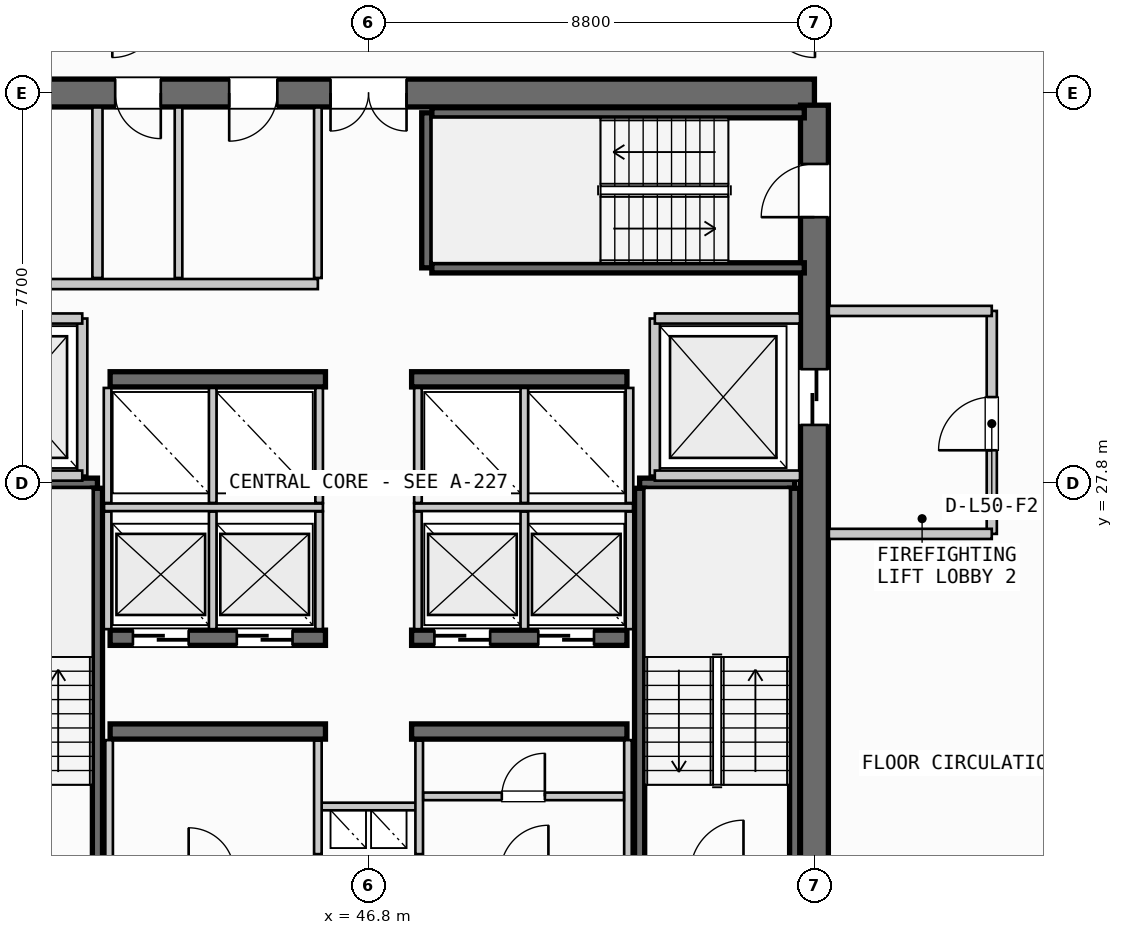
"""IFC4 building model, lengths in metres.
Left out: names, types, materials, properties, quantities, classifications, styles, units other than length and angle.
Written with IfcOpenShell. Run it as: python <this file> out.ifc"""

import sys

from ifc_helpers import new_model, si_unit, direction, frame, frame_2d, origin, place, context, subcontext, project, spatial, rectangle, extrude, source, transform, mapped, element, fill, save


model = new_model("IFC4")
c1 = context("Model", 3, precision=1e-05, world=origin(), true_north=direction((0.0, 1.0)))
c2 = subcontext(c1, "Body", "Model", "MODEL_VIEW")
j1 = project(units=[si_unit("LENGTHUNIT", "METRE"), si_unit("PLANEANGLEUNIT", "RADIAN")], contexts=[c1])
p1 = place(None, origin())
s1 = spatial("IfcSite", under=j1, at=p1, CompositionType="ELEMENT")
p2 = place(p1, origin())
s2 = spatial("IfcBuilding", under=s1, at=p2, CompositionType="ELEMENT")
p3 = place(p2, frame((0.0, 0.0, 193.9)))
s3 = spatial("IfcBuildingStorey", under=s2, at=p3, CompositionType="ELEMENT", Elevation=193.9)
p4 = place(p3, frame((55.6, 35.5, 0.0), z_axis=(0.0, 0.0, 1.0), x_axis=(-1.0, 0.0, 0.0)))
e1 = element("IfcWall", 1, at=p4, inside=s3, PredefinedType="SHEAR", context=c2, shape_type="SweptSolid", body=[
    extrude(rectangle(XDim=17.6, YDim=0.55, at=frame_2d((8.8, 0.0))), origin(), (0.0, 0.0, 1.0), 3.26),
])
p5 = place(p4, frame((8.05, 0.0, 0.0)))
e2 = element("IfcOpeningElement", 2, at=p5, cuts=e1, PredefinedType="OPENING", context=c2, shape_type="SweptSolid", body=[
    extrude(rectangle(XDim=1.5, YDim=2.2, at=frame_2d((0.75, 1.1))), frame((0.0, 0.285, 0.0), z_axis=(0.0, -1.0, 0.0), x_axis=(1.0, 0.0, 0.0)), (0.0, 0.0, 1.0), 0.57),
])
p6 = place(p4, frame((15.1, 0.0, 0.0)))
e3 = element("IfcOpeningElement", 3, at=p6, cuts=e1, PredefinedType="OPENING", context=c2, shape_type="SweptSolid", body=[
    extrude(rectangle(XDim=0.95, YDim=2.15, at=frame_2d((0.475, 1.075))), frame((0.0, 0.285, 0.0), z_axis=(0.0, -1.0, 0.0), x_axis=(1.0, 0.0, 0.0)), (0.0, 0.0, 1.0), 0.57),
])
p7 = place(p4, frame((12.9, 0.0, 0.0)))
e4 = element("IfcOpeningElement", 4, at=p7, cuts=e1, PredefinedType="OPENING", context=c2, shape_type="SweptSolid", body=[
    extrude(rectangle(XDim=0.9, YDim=2.15, at=frame_2d((0.45, 1.075))), frame((0.0, 0.285, 0.0), z_axis=(0.0, -1.0, 0.0), x_axis=(1.0, 0.0, 0.0)), (0.0, 0.0, 1.0), 0.57),
])
p8 = place(p4, frame((10.6, 0.0, 0.0)))
e5 = element("IfcOpeningElement", 5, at=p8, cuts=e1, PredefinedType="OPENING", context=c2, shape_type="SweptSolid", body=[
    extrude(rectangle(XDim=0.95, YDim=2.15, at=frame_2d((0.475, 1.075))), frame((0.0, 0.285, 0.0), z_axis=(0.0, -1.0, 0.0), x_axis=(1.0, 0.0, 0.0)), (0.0, 0.0, 1.0), 0.57),
])
p9 = place(p3, frame((55.6, 20.34, 0.0), z_axis=(0.0, 0.0, 1.0), x_axis=(0.0, 1.0, 0.0)))
e6 = element("IfcWall", 6, at=p9, inside=s3, PredefinedType="SHEAR", context=c2, shape_type="SweptSolid", body=[
    extrude(rectangle(XDim=14.92, YDim=0.55, at=frame_2d((7.46, 0.0))), origin(), (0.0, 0.0, 1.0), 3.26),
])
p10 = place(p9, frame((12.71, 0.0, 0.0)))
e7 = element("IfcOpeningElement", 7, at=p10, cuts=e6, PredefinedType="OPENING", context=c2, shape_type="SweptSolid", body=[
    extrude(rectangle(XDim=1.05, YDim=2.15, at=frame_2d((0.525, 1.075))), frame((0.0, 0.285, 0.0), z_axis=(0.0, -1.0, 0.0), x_axis=(1.0, 0.0, 0.0)), (0.0, 0.0, 1.0), 0.57),
])
p11 = place(p9, frame((8.61, 0.0, 0.0)))
e8 = element("IfcOpeningElement", 8, at=p11, cuts=e6, PredefinedType="OPENING", context=c2, shape_type="SweptSolid", body=[
    extrude(rectangle(XDim=1.1, YDim=2.2, at=frame_2d((0.55, 1.1))), frame((0.0, 0.285, 0.0), z_axis=(0.0, -1.0, 0.0), x_axis=(1.0, 0.0, 0.0)), (0.0, 0.0, 1.0), 0.57),
])
for number, where, z_axis, x_axis in (
    (9, (41.7, 22.9, 0.0), (0.0, 0.0, 1.0), (1.0, 0.0, 0.0)),
    (10, (47.65, 22.9, 0.0), (0.0, 0.0, 1.0), (1.0, 0.0, 0.0)),
):
    element("IfcWall", number, at=place(p3, frame(where, z_axis=z_axis, x_axis=x_axis)), inside=s3, PredefinedType="SHEAR", context=c2, shape_type="SweptSolid", body=[
        extrude(rectangle(XDim=4.25, YDim=0.3, at=frame_2d((2.125, 0.0))), origin(), (0.0, 0.0, 1.0), 3.26),
    ])
p12 = place(p3, frame((41.7, 24.75, 0.0), z_axis=(0.0, 0.0, 1.0), x_axis=(1.0, 0.0, 0.0)))
e11 = element("IfcWall", 11, at=p12, inside=s3, PredefinedType="SHEAR", context=c2, shape_type="SweptSolid", body=[
    extrude(rectangle(XDim=4.25, YDim=0.3, at=frame_2d((2.125, 0.0))), origin(), (0.0, 0.0, 1.0), 3.26),
])
p13 = place(p12, frame((0.45, 0.0, 0.0)))
e12 = element("IfcOpeningElement", 12, at=p13, cuts=e11, PredefinedType="OPENING", context=c2, shape_type="SweptSolid", body=[
    extrude(rectangle(XDim=1.1, YDim=2.2, at=frame_2d((0.55, 1.1))), frame((0.0, 0.16, 0.0), z_axis=(0.0, -1.0, 0.0), x_axis=(1.0, 0.0, 0.0)), (0.0, 0.0, 1.0), 0.32),
])
p14 = place(p12, frame((2.5, 0.0, 0.0)))
e13 = element("IfcOpeningElement", 13, at=p14, cuts=e11, PredefinedType="OPENING", context=c2, shape_type="SweptSolid", body=[
    extrude(rectangle(XDim=1.1, YDim=2.2, at=frame_2d((0.55, 1.1))), frame((0.0, 0.16, 0.0), z_axis=(0.0, -1.0, 0.0), x_axis=(1.0, 0.0, 0.0)), (0.0, 0.0, 1.0), 0.32),
])
p15 = place(p3, frame((47.65, 24.75, 0.0), z_axis=(0.0, 0.0, 1.0), x_axis=(1.0, 0.0, 0.0)))
e14 = element("IfcWall", 14, at=p15, inside=s3, PredefinedType="SHEAR", context=c2, shape_type="SweptSolid", body=[
    extrude(rectangle(XDim=4.25, YDim=0.3, at=frame_2d((2.125, 0.0))), origin(), (0.0, 0.0, 1.0), 3.26),
])
p16 = place(p15, frame((0.45, 0.0, 0.0)))
e15 = element("IfcOpeningElement", 15, at=p16, cuts=e14, PredefinedType="OPENING", context=c2, shape_type="SweptSolid", body=[
    extrude(rectangle(XDim=1.1, YDim=2.2, at=frame_2d((0.55, 1.1))), frame((0.0, 0.16, 0.0), z_axis=(0.0, -1.0, 0.0), x_axis=(1.0, 0.0, 0.0)), (0.0, 0.0, 1.0), 0.32),
])
p17 = place(p15, frame((2.5, 0.0, 0.0)))
e16 = element("IfcOpeningElement", 16, at=p17, cuts=e14, PredefinedType="OPENING", context=c2, shape_type="SweptSolid", body=[
    extrude(rectangle(XDim=1.1, YDim=2.2, at=frame_2d((0.55, 1.1))), frame((0.0, 0.16, 0.0), z_axis=(0.0, -1.0, 0.0), x_axis=(1.0, 0.0, 0.0)), (0.0, 0.0, 1.0), 0.32),
])
for number, where, z_axis, x_axis in (
    (17, (41.7, 29.85, 0.0), (0.0, 0.0, 1.0), (1.0, 0.0, 0.0)),
    (18, (47.65, 29.85, 0.0), (0.0, 0.0, 1.0), (1.0, 0.0, 0.0)),
):
    element("IfcWall", number, at=place(p3, frame(where, z_axis=z_axis, x_axis=x_axis)), inside=s3, PredefinedType="SHEAR", context=c2, shape_type="SweptSolid", body=[
        extrude(rectangle(XDim=4.25, YDim=0.3, at=frame_2d((2.125, 0.0))), origin(), (0.0, 0.0, 1.0), 3.26),
    ])
p18 = place(p3, frame((38.39, 27.8, 0.0), z_axis=(0.0, 0.0, 1.0), x_axis=(1.0, 0.0, 0.0)))
e19 = element("IfcWall", 19, at=p18, inside=s3, PredefinedType="SHEAR", context=c2, shape_type="SweptSolid", body=[
    extrude(rectangle(XDim=3.06, YDim=0.2, at=frame_2d((1.53, 0.0))), origin(), (0.0, 0.0, 1.0), 3.26),
])
p19 = place(p3, frame((41.45, 27.7, 0.0), z_axis=(0.0, 0.0, 1.0), x_axis=(0.0, -1.0, 0.0)))
e20 = element("IfcWall", 20, at=p19, inside=s3, PredefinedType="SHEAR", context=c2, shape_type="SweptSolid", body=[
    extrude(rectangle(XDim=7.35, YDim=0.2, at=frame_2d((3.675, 0.0))), origin(), (0.0, 0.0, 1.0), 3.26),
])
p20 = place(p3, frame((52.15, 27.8, 0.0), z_axis=(0.0, 0.0, 1.0), x_axis=(1.0, 0.0, 0.0)))
e21 = element("IfcWall", 21, at=p20, inside=s3, PredefinedType="SHEAR", context=c2, shape_type="SweptSolid", body=[
    extrude(rectangle(XDim=3.06, YDim=0.2, at=frame_2d((1.53, 0.0))), origin(), (0.0, 0.0, 1.0), 3.26),
])
for number, where, z_axis, x_axis in (
    (22, (55.21, 27.7, 0.0), (0.0, 0.0, 1.0), (0.0, -1.0, 0.0)),
    (23, (52.15, 20.35, 0.0), (0.0, 0.0, 1.0), (0.0, 1.0, 0.0)),
):
    element("IfcWall", number, at=place(p3, frame(where, z_axis=z_axis, x_axis=x_axis)), inside=s3, PredefinedType="SHEAR", context=c2, shape_type="SweptSolid", body=[
        extrude(rectangle(XDim=7.35, YDim=0.2, at=frame_2d((3.675, 0.0))), origin(), (0.0, 0.0, 1.0), 3.26),
    ])
p21 = place(p3, frame((47.95, 32.05, 0.0), z_axis=(0.0, 0.0, 1.0), x_axis=(0.0, 1.0, 0.0)))
e24 = element("IfcWall", 24, at=p21, inside=s3, PredefinedType="SHEAR", context=c2, shape_type="SweptSolid", body=[
    extrude(rectangle(XDim=3.06, YDim=0.2, at=frame_2d((1.53, 0.0))), origin(), (0.0, 0.0, 1.0), 3.26),
])
for number, where, z_axis, x_axis in (
    (25, (48.05, 35.11, 0.0), (0.0, 0.0, 1.0), (1.0, 0.0, 0.0)),
    (26, (55.4, 32.05, 0.0), (0.0, 0.0, 1.0), (-1.0, 0.0, 0.0)),
):
    element("IfcWall", number, at=place(p3, frame(where, z_axis=z_axis, x_axis=x_axis)), inside=s3, PredefinedType="SHEAR", context=c2, shape_type="SweptSolid", body=[
        extrude(rectangle(XDim=7.35, YDim=0.2, at=frame_2d((3.675, 0.0))), origin(), (0.0, 0.0, 1.0), 3.26),
    ])
p22 = place(p3, frame((45.8, 21.42, 0.0), z_axis=(0.0, 0.0, 1.0), x_axis=(1.0, 0.0, 0.0)))
e27 = element("IfcWall", 27, at=p22, inside=s3, PredefinedType="PARTITIONING", context=c2, shape_type="SweptSolid", body=[
    extrude(rectangle(XDim=2.0, YDim=0.15, at=frame_2d((1.0, 0.0))), origin(), (0.0, 0.0, 1.0), 2.735),
])
for number, where, z_axis, x_axis in (
    (28, (45.8, 20.48, 0.0), (0.0, 0.0, 1.0), (0.0, 1.0, 0.0)),
    (29, (47.8, 20.48, 0.0), (0.0, 0.0, 1.0), (0.0, 1.0, 0.0)),
):
    element("IfcWall", number, at=place(p3, frame(where, z_axis=z_axis, x_axis=x_axis)), inside=s3, PredefinedType="PARTITIONING", context=c2, shape_type="SweptSolid", body=[
        extrude(rectangle(XDim=2.24, YDim=0.15, at=frame_2d((1.12, 0.0))), origin(), (0.0, 0.0, 1.0), 2.735),
    ])
p23 = place(p3, frame((41.15, 27.95, 0.0), z_axis=(0.0, 0.0, 1.0), x_axis=(0.0, 1.0, 0.0)))
e30 = element("IfcWall", 30, at=p23, inside=s3, PredefinedType="PARTITIONING", context=c2, shape_type="SweptSolid", body=[
    extrude(rectangle(XDim=3.1, YDim=0.2, at=frame_2d((1.55, 0.0))), origin(), (0.0, 0.0, 1.0), 2.735),
])
for number, where, z_axis, x_axis in (
    (31, (38.285, 27.95, 0.0), (0.0, 0.0, 1.0), (1.0, 0.0, 0.0)),
    (32, (38.285, 31.05, 0.0), (0.0, 0.0, 1.0), (1.0, 0.0, 0.0)),
):
    element("IfcWall", number, at=place(p3, frame(where, z_axis=z_axis, x_axis=x_axis)), inside=s3, PredefinedType="PARTITIONING", context=c2, shape_type="SweptSolid", body=[
        extrude(rectangle(XDim=2.865, YDim=0.2, at=frame_2d((1.433, 0.0))), origin(), (0.0, 0.0, 1.0), 2.735),
    ])
p24 = place(p3, frame((52.45, 27.95, 0.0), z_axis=(0.0, 0.0, 1.0), x_axis=(0.0, 1.0, 0.0)))
e33 = element("IfcWall", 33, at=p24, inside=s3, PredefinedType="PARTITIONING", context=c2, shape_type="SweptSolid", body=[
    extrude(rectangle(XDim=3.1, YDim=0.2, at=frame_2d((1.55, 0.0))), origin(), (0.0, 0.0, 1.0), 2.735),
])
for number, where, z_axis, x_axis in (
    (34, (52.45, 27.95, 0.0), (0.0, 0.0, 1.0), (1.0, 0.0, 0.0)),
    (35, (52.45, 31.05, 0.0), (0.0, 0.0, 1.0), (1.0, 0.0, 0.0)),
):
    element("IfcWall", number, at=place(p3, frame(where, z_axis=z_axis, x_axis=x_axis)), inside=s3, PredefinedType="PARTITIONING", context=c2, shape_type="SweptSolid", body=[
        extrude(rectangle(XDim=2.865, YDim=0.2, at=frame_2d((1.433, 0.0))), origin(), (0.0, 0.0, 1.0), 2.735),
    ])
p25 = place(p3, frame((59.1, 26.8, 0.0), z_axis=(0.0, 0.0, 1.0), x_axis=(0.0, 1.0, 0.0)))
e36 = element("IfcWall", 36, at=p25, inside=s3, PredefinedType="PARTITIONING", context=c2, shape_type="SweptSolid", body=[
    extrude(rectangle(XDim=4.4, YDim=0.2, at=frame_2d((2.2, 0.0))), origin(), (0.0, 0.0, 1.0), 2.735),
])
p26 = place(p25, frame((1.65, 0.0, 0.0)))
e37 = element("IfcOpeningElement", 37, at=p26, cuts=e36, PredefinedType="OPENING", context=c2, shape_type="SweptSolid", body=[
    extrude(rectangle(XDim=1.05, YDim=2.15, at=frame_2d((0.525, 1.075))), frame((0.0, 0.11, 0.0), z_axis=(0.0, -1.0, 0.0), x_axis=(1.0, 0.0, 0.0)), (0.0, 0.0, 1.0), 0.22),
])
for number, where, z_axis, x_axis in (
    (38, (55.885, 26.8, 0.0), (0.0, 0.0, 1.0), (1.0, 0.0, 0.0)),
    (39, (55.885, 31.2, 0.0), (0.0, 0.0, 1.0), (1.0, 0.0, 0.0)),
):
    element("IfcWall", number, at=place(p3, frame(where, z_axis=z_axis, x_axis=x_axis)), inside=s3, PredefinedType="PARTITIONING", context=c2, shape_type="SweptSolid", body=[
        extrude(rectangle(XDim=3.215, YDim=0.2, at=frame_2d((1.607, 0.0))), origin(), (0.0, 0.0, 1.0), 2.735),
    ])
for number, where, z_axis, x_axis in (
    (40, (41.68, 20.385, 0.0), (0.0, 0.0, 1.0), (0.0, 1.0, 0.0)),
    (41, (51.92, 20.385, 0.0), (0.0, 0.0, 1.0), (0.0, 1.0, 0.0)),
):
    element("IfcWall", number, at=place(p3, frame(where, z_axis=z_axis, x_axis=x_axis)), inside=s3, PredefinedType="PARTITIONING", context=c2, shape_type="SweptSolid", body=[
        extrude(rectangle(XDim=2.345, YDim=0.15, at=frame_2d((1.172, 0.0))), origin(), (0.0, 0.0, 1.0), 2.735),
    ])
p27 = place(p3, frame((47.88, 21.62, 0.0), z_axis=(0.0, 0.0, 1.0), x_axis=(1.0, 0.0, 0.0)))
e42 = element("IfcWall", 42, at=p27, inside=s3, PredefinedType="PARTITIONING", context=c2, shape_type="SweptSolid", body=[
    extrude(rectangle(XDim=3.96, YDim=0.15, at=frame_2d((1.98, 0.0))), origin(), (0.0, 0.0, 1.0), 2.735),
])
p28 = place(p27, frame((1.55, 0.0, 0.0)))
e43 = element("IfcOpeningElement", 43, at=p28, cuts=e42, PredefinedType="OPENING", context=c2, shape_type="SweptSolid", body=[
    extrude(rectangle(XDim=0.85, YDim=2.15, at=frame_2d((0.425, 1.075))), frame((0.0, 0.085, 0.0), z_axis=(0.0, -1.0, 0.0), x_axis=(1.0, 0.0, 0.0)), (0.0, 0.0, 1.0), 0.17),
])
p29 = place(p3, frame((41.58, 27.325, 0.0), z_axis=(0.0, 0.0, 1.0), x_axis=(1.0, 0.0, 0.0)))
e44 = element("IfcWall", 44, at=p29, inside=s3, PredefinedType="PARTITIONING", context=c2, shape_type="SweptSolid", body=[
    extrude(rectangle(XDim=4.32, YDim=0.15, at=frame_2d((2.16, 0.0))), origin(), (0.0, 0.0, 1.0), 2.735),
])
p30 = place(p3, frame((47.7, 27.325, 0.0), z_axis=(0.0, 0.0, 1.0), x_axis=(1.0, 0.0, 0.0)))
e45 = element("IfcWall", 45, at=p30, inside=s3, PredefinedType="PARTITIONING", context=c2, shape_type="SweptSolid", body=[
    extrude(rectangle(XDim=4.32, YDim=0.15, at=frame_2d((2.16, 0.0))), origin(), (0.0, 0.0, 1.0), 2.735),
])
for number, where, z_axis, x_axis in (
    (46, (41.65, 24.92, 0.0), (0.0, 0.0, 1.0), (0.0, 1.0, 0.0)),
    (47, (43.725, 24.92, 0.0), (0.0, 0.0, 1.0), (0.0, 1.0, 0.0)),
    (48, (45.825, 24.92, 0.0), (0.0, 0.0, 1.0), (0.0, 1.0, 0.0)),
    (49, (47.775, 24.92, 0.0), (0.0, 0.0, 1.0), (0.0, 1.0, 0.0)),
    (50, (49.875, 24.92, 0.0), (0.0, 0.0, 1.0), (0.0, 1.0, 0.0)),
    (51, (51.95, 24.92, 0.0), (0.0, 0.0, 1.0), (0.0, 1.0, 0.0)),
):
    element("IfcWall", number, at=place(p3, frame(where, z_axis=z_axis, x_axis=x_axis)), inside=s3, PredefinedType="PARTITIONING", context=c2, shape_type="SweptSolid", body=[
        extrude(rectangle(XDim=2.32, YDim=0.15, at=frame_2d((1.16, 0.0))), origin(), (0.0, 0.0, 1.0), 2.735),
    ])
for number, where, z_axis, x_axis in (
    (52, (41.65, 27.41, 0.0), (0.0, 0.0, 1.0), (0.0, 1.0, 0.0)),
    (53, (43.725, 27.41, 0.0), (0.0, 0.0, 1.0), (0.0, 1.0, 0.0)),
    (54, (45.825, 27.41, 0.0), (0.0, 0.0, 1.0), (0.0, 1.0, 0.0)),
    (55, (47.775, 27.41, 0.0), (0.0, 0.0, 1.0), (0.0, 1.0, 0.0)),
    (56, (49.875, 27.41, 0.0), (0.0, 0.0, 1.0), (0.0, 1.0, 0.0)),
    (57, (51.95, 27.41, 0.0), (0.0, 0.0, 1.0), (0.0, 1.0, 0.0)),
):
    element("IfcWall", number, at=place(p3, frame(where, z_axis=z_axis, x_axis=x_axis)), inside=s3, PredefinedType="PARTITIONING", context=c2, shape_type="SweptSolid", body=[
        extrude(rectangle(XDim=2.27, YDim=0.15, at=frame_2d((1.135, 0.0))), origin(), (0.0, 0.0, 1.0), 2.735),
    ])
p31 = place(p3, frame((41.45, 31.85, 0.0), z_axis=(0.0, 0.0, 1.0), x_axis=(0.0, 1.0, 0.0)))
e58 = element("IfcWall", 58, at=p31, inside=s3, PredefinedType="PARTITIONING", context=c2, shape_type="SweptSolid", body=[
    extrude(rectangle(XDim=3.365, YDim=0.2, at=frame_2d((1.683, 0.0))), origin(), (0.0, 0.0, 1.0), 2.735),
])
p32 = place(p3, frame((38.285, 31.73, 0.0), z_axis=(0.0, 0.0, 1.0), x_axis=(1.0, 0.0, 0.0)))
e59 = element("IfcWall", 59, at=p32, inside=s3, PredefinedType="PARTITIONING", context=c2, shape_type="SweptSolid", body=[
    extrude(rectangle(XDim=7.515, YDim=0.2, at=frame_2d((3.758, 0.0))), origin(), (0.0, 0.0, 1.0), 2.735),
])
p33 = place(p3, frame((45.8, 31.85, 0.0), z_axis=(0.0, 0.0, 1.0), x_axis=(0.0, 1.0, 0.0)))
e60 = element("IfcWall", 60, at=p33, inside=s3, PredefinedType="PARTITIONING", context=c2, shape_type="SweptSolid", body=[
    extrude(rectangle(XDim=3.365, YDim=0.15, at=frame_2d((1.683, 0.0))), origin(), (0.0, 0.0, 1.0), 2.735),
])
p34 = place(p3, frame((43.05, 31.85, 0.0), z_axis=(0.0, 0.0, 1.0), x_axis=(0.0, 1.0, 0.0)))
e61 = element("IfcWall", 61, at=p34, inside=s3, PredefinedType="PLUMBINGWALL", context=c2, shape_type="SweptSolid", body=[
    extrude(rectangle(XDim=3.365, YDim=0.15, at=frame_2d((1.683, 0.0))), origin(), (0.0, 0.0, 1.0), 2.735),
])
m1 = source(origin(), c2, "Body", "SweptSolid", [
    extrude(rectangle(XDim=1.05, YDim=2.15, at=frame_2d((0.525, 1.075))), frame((0.0, 0.025, 0.0), z_axis=(0.0, -1.0, 0.0), x_axis=(1.0, 0.0, 0.0)), (0.0, 0.0, 1.0), 0.05),
])
p35 = place(p10, origin())
e62 = element("IfcDoor", 62, at=p35, inside=s3, OperationType="SINGLE_SWING_LEFT", PredefinedType="DOOR", context=c2, shape_type="MappedRepresentation", body=[
    mapped(m1, transform((0.0, 0.0, 0.0), scale=1.0)),
])
fill(e7, e62)
m2 = source(origin(), c2, "Body", "SweptSolid", [
    extrude(rectangle(XDim=1.5, YDim=2.2, at=frame_2d((0.75, 1.1))), frame((0.0, 0.025, 0.0), z_axis=(0.0, -1.0, 0.0), x_axis=(1.0, 0.0, 0.0)), (0.0, 0.0, 1.0), 0.05),
])
p36 = place(p5, origin())
e63 = element("IfcDoor", 63, at=p36, inside=s3, OperationType="DOUBLE_DOOR_SINGLE_SWING", PredefinedType="DOOR", context=c2, shape_type="MappedRepresentation", body=[
    mapped(m2, transform((0.0, 0.0, 0.0), scale=1.0)),
])
fill(e2, e63)
m3 = source(origin(), c2, "Body", "SweptSolid", [
    extrude(rectangle(XDim=1.1, YDim=2.2, at=frame_2d((0.55, 1.1))), frame((0.0, 0.025, 0.0), z_axis=(0.0, -1.0, 0.0), x_axis=(1.0, 0.0, 0.0)), (0.0, 0.0, 1.0), 0.05),
])
p37 = place(p11, origin())
e64 = element("IfcDoor", 64, at=p37, inside=s3, OperationType="SLIDING_TO_RIGHT", PredefinedType="DOOR", context=c2, shape_type="MappedRepresentation", body=[
    mapped(m3, transform((0.0, 0.0, 0.0), scale=1.0)),
])
fill(e8, e64)
p38 = place(p13, origin())
e65 = element("IfcDoor", 65, at=p38, inside=s3, OperationType="SLIDING_TO_RIGHT", PredefinedType="DOOR", context=c2, shape_type="MappedRepresentation", body=[
    mapped(m3, transform((0.0, 0.0, 0.0), scale=1.0)),
])
fill(e12, e65)
p39 = place(p14, origin())
e66 = element("IfcDoor", 66, at=p39, inside=s3, OperationType="SLIDING_TO_RIGHT", PredefinedType="DOOR", context=c2, shape_type="MappedRepresentation", body=[
    mapped(m3, transform((0.0, 0.0, 0.0), scale=1.0)),
])
fill(e13, e66)
p40 = place(p16, origin())
e67 = element("IfcDoor", 67, at=p40, inside=s3, OperationType="SLIDING_TO_RIGHT", PredefinedType="DOOR", context=c2, shape_type="MappedRepresentation", body=[
    mapped(m3, transform((0.0, 0.0, 0.0), scale=1.0)),
])
fill(e15, e67)
p41 = place(p17, origin())
e68 = element("IfcDoor", 68, at=p41, inside=s3, OperationType="SLIDING_TO_RIGHT", PredefinedType="DOOR", context=c2, shape_type="MappedRepresentation", body=[
    mapped(m3, transform((0.0, 0.0, 0.0), scale=1.0)),
])
fill(e16, e68)
m4 = source(origin(), c2, "Body", "SweptSolid", [
    extrude(rectangle(XDim=0.9, YDim=2.15, at=frame_2d((0.45, 1.075))), frame((0.0, 0.025, 0.0), z_axis=(0.0, -1.0, 0.0), x_axis=(1.0, 0.0, 0.0)), (0.0, 0.0, 1.0), 0.05),
])
p42 = place(p7, origin())
e69 = element("IfcDoor", 69, at=p42, inside=s3, OperationType="SINGLE_SWING_LEFT", PredefinedType="DOOR", context=c2, shape_type="MappedRepresentation", body=[
    mapped(m4, transform((0.0, 0.0, 0.0), scale=1.0)),
])
fill(e4, e69)
m5 = source(origin(), c2, "Body", "SweptSolid", [
    extrude(rectangle(XDim=0.95, YDim=2.15, at=frame_2d((0.475, 1.075))), frame((0.0, 0.025, 0.0), z_axis=(0.0, -1.0, 0.0), x_axis=(1.0, 0.0, 0.0)), (0.0, 0.0, 1.0), 0.05),
])
p43 = place(p8, origin())
e70 = element("IfcDoor", 70, at=p43, inside=s3, OperationType="SINGLE_SWING_RIGHT", PredefinedType="DOOR", context=c2, shape_type="MappedRepresentation", body=[
    mapped(m5, transform((0.0, 0.0, 0.0), scale=1.0)),
])
fill(e5, e70)
p44 = place(p26, origin())
e71 = element("IfcDoor", 71, at=p44, inside=s3, OperationType="SINGLE_SWING_LEFT", PredefinedType="DOOR", context=c2, shape_type="MappedRepresentation", body=[
    mapped(m1, transform((0.0, 0.0, 0.0), scale=1.0)),
])
fill(e37, e71)
m6 = source(origin(), c2, "Body", "SweptSolid", [
    extrude(rectangle(XDim=0.85, YDim=2.15, at=frame_2d((0.425, 1.075))), frame((0.0, 0.025, 0.0), z_axis=(0.0, -1.0, 0.0), x_axis=(1.0, 0.0, 0.0)), (0.0, 0.0, 1.0), 0.05),
])
p45 = place(p28, origin())
e72 = element("IfcDoor", 72, at=p45, inside=s3, OperationType="SINGLE_SWING_RIGHT", PredefinedType="DOOR", context=c2, shape_type="MappedRepresentation", body=[
    mapped(m6, transform((0.0, 0.0, 0.0), scale=1.0)),
])
fill(e43, e72)
save(model, sys.argv[1])
